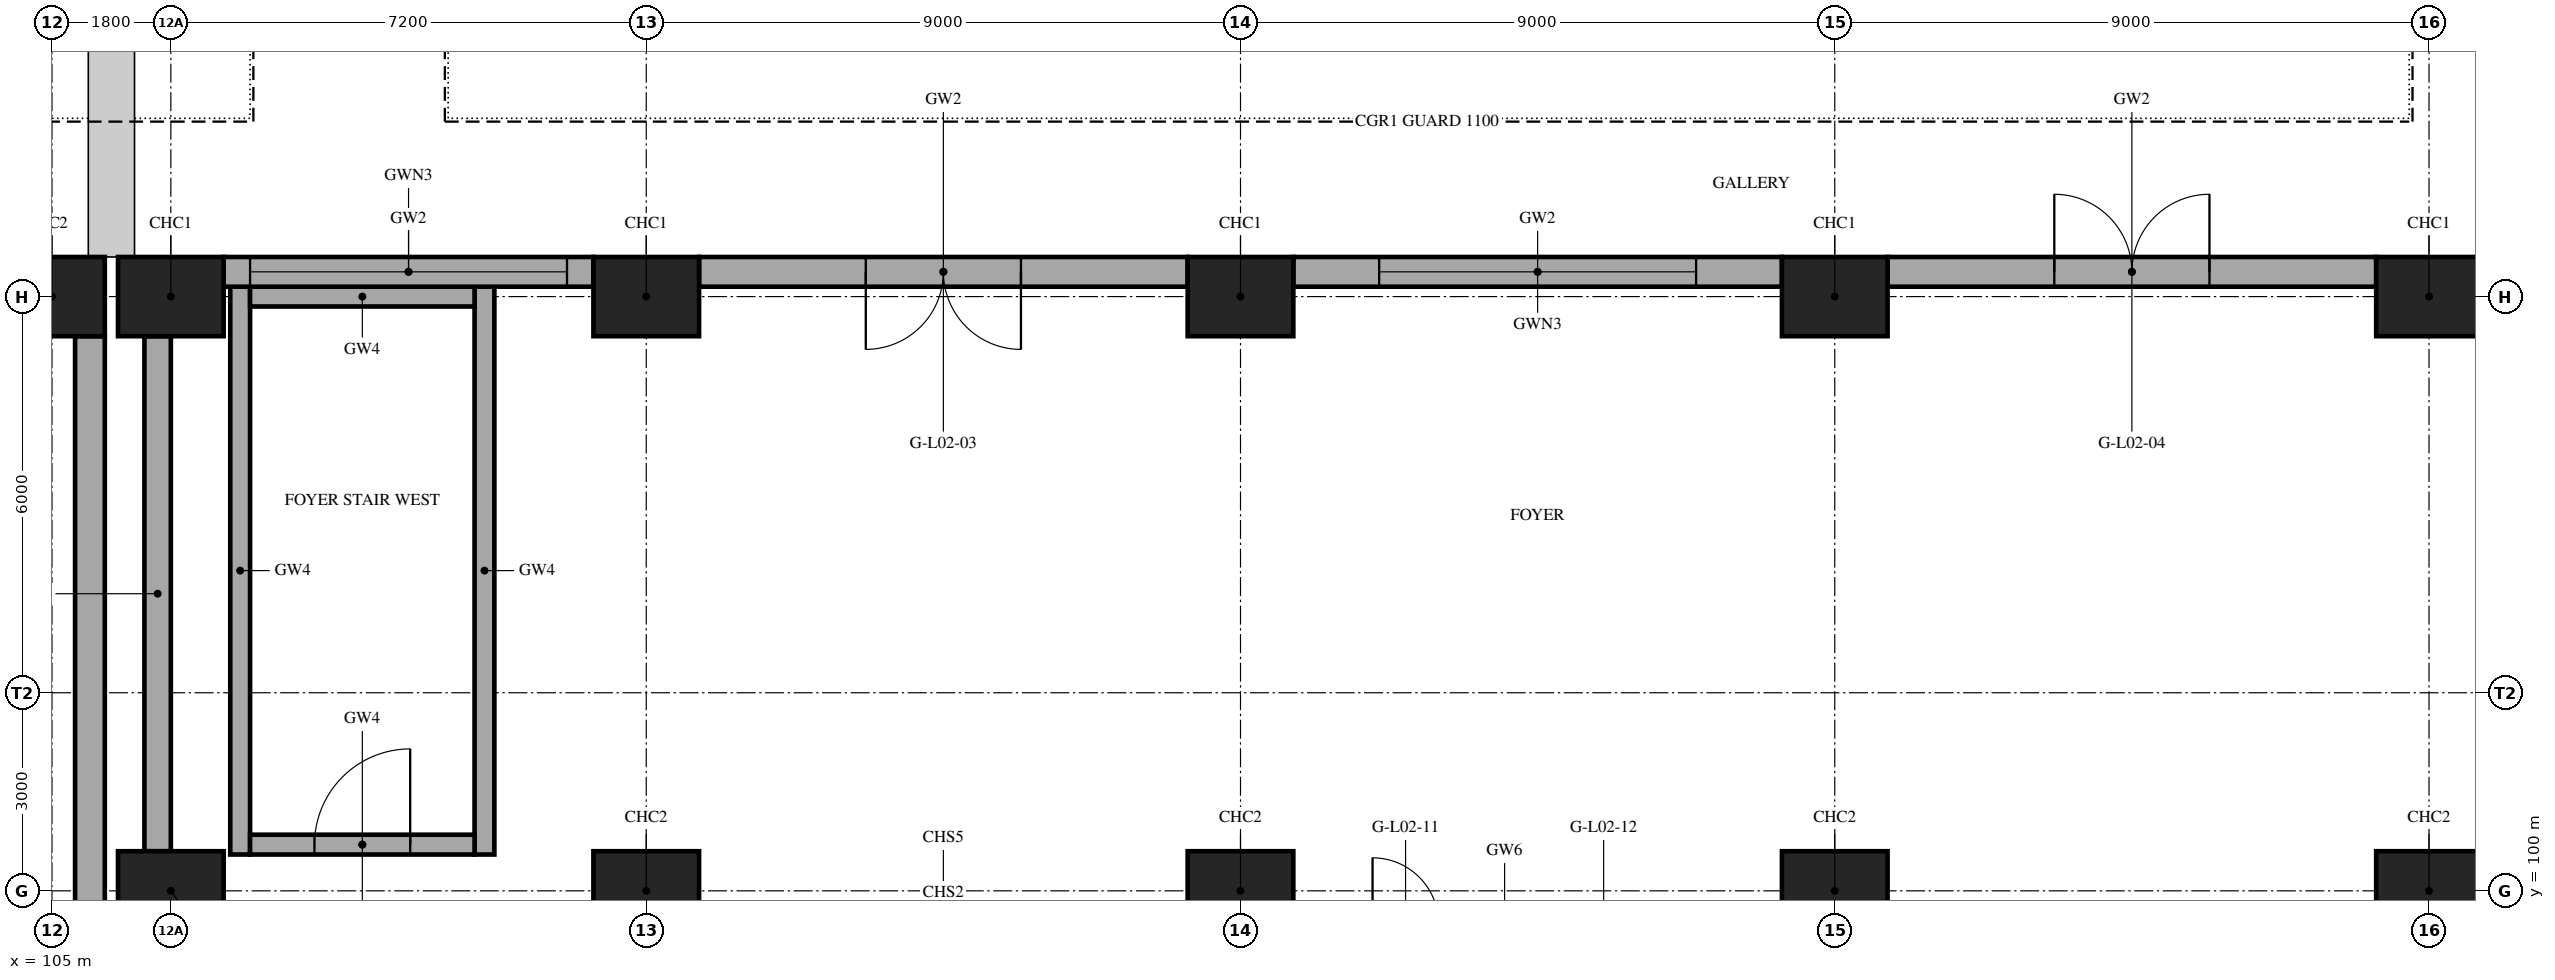
"""IFC4 building model, lengths in metres.
Left out: names, types, materials, properties, quantities, classifications, styles, units other than length and angle.
Written with IfcOpenShell. Run it as: python <this file> out.ifc"""

import sys

from ifc_helpers import new_model, si_unit, direction, frame, frame_2d, origin, origin_2d, place, context, subcontext, project, spatial, rectangle, extrude, element, fill, save


model = new_model("IFC4")
c1 = context("Model", 3, precision=1e-05, world=origin(), true_north=direction((0.0, 1.0)))
c2 = subcontext(c1, "Body", "Model", "MODEL_VIEW")
j1 = project(units=[si_unit("LENGTHUNIT", "METRE"), si_unit("PLANEANGLEUNIT", "RADIAN")], contexts=[c1])
p1 = place(None, origin())
s1 = spatial("IfcSite", under=j1, at=p1, CompositionType="ELEMENT")
p2 = place(p1, origin())
s2 = spatial("IfcBuilding", under=s1, at=p2, CompositionType="ELEMENT")
p3 = place(p2, frame((0.0, 0.0, 10.0)))
s3 = spatial("IfcBuildingStorey", under=s2, at=p3, CompositionType="ELEMENT", Elevation=10.0)
for number, where, z_axis, x_axis in (
    (1, (105.0, 109.0, 0.0), (0.0, 0.0, 1.0), (1.0, 0.0, 0.0)),
    (2, (106.8, 100.0, 0.0), (0.0, 0.0, 1.0), (1.0, 0.0, 0.0)),
    (3, (114.0, 100.0, 0.0), (0.0, 0.0, 1.0), (1.0, 0.0, 0.0)),
    (4, (123.0, 100.0, 0.0), (0.0, 0.0, 1.0), (1.0, 0.0, 0.0)),
    (5, (132.0, 100.0, 0.0), (0.0, 0.0, 1.0), (1.0, 0.0, 0.0)),
    (6, (141.0, 100.0, 0.0), (0.0, 0.0, 1.0), (1.0, 0.0, 0.0)),
    (7, (106.8, 109.0, 0.0), (0.0, 0.0, 1.0), (1.0, 0.0, 0.0)),
    (8, (114.0, 109.0, 0.0), (0.0, 0.0, 1.0), (1.0, 0.0, 0.0)),
    (9, (123.0, 109.0, 0.0), (0.0, 0.0, 1.0), (1.0, 0.0, 0.0)),
    (10, (132.0, 109.0, 0.0), (0.0, 0.0, 1.0), (1.0, 0.0, 0.0)),
    (11, (141.0, 109.0, 0.0), (0.0, 0.0, 1.0), (1.0, 0.0, 0.0)),
):
    element("IfcColumn", number, at=place(p3, frame(where, z_axis=z_axis, x_axis=x_axis)), inside=s3, PredefinedType="COLUMN", context=c2, shape_type="SweptSolid", body=[
        extrude(rectangle(XDim=1.6, YDim=1.2, at=origin_2d()), origin(), (0.0, 0.0, 1.0), 5.0),
    ])
for number, where, z_axis, x_axis in (
    (12, (107.85, 100.55, 0.0), (0.0, 0.0, 1.0), (0.0, 1.0, 0.0)),
    (13, (111.55, 100.55, 0.0), (0.0, 0.0, 1.0), (0.0, 1.0, 0.0)),
):
    element("IfcWall", number, at=place(p3, frame(where, z_axis=z_axis, x_axis=x_axis)), inside=s3, PredefinedType="SHEAR", context=c2, shape_type="SweptSolid", body=[
        extrude(rectangle(XDim=8.6, YDim=0.3, at=frame_2d((4.3, 0.0))), origin(), (0.0, 0.0, 1.0), 4.6),
    ])
p4 = place(p3, frame((108.0, 100.7, 0.0), z_axis=(0.0, 0.0, 1.0), x_axis=(1.0, 0.0, 0.0)))
e14 = element("IfcWall", 14, at=p4, inside=s3, PredefinedType="SHEAR", context=c2, shape_type="SweptSolid", body=[
    extrude(rectangle(XDim=3.4, YDim=0.3, at=frame_2d((1.7, 0.0))), origin(), (0.0, 0.0, 1.0), 4.6),
])
p5 = place(p4, frame((0.975, 0.0, 0.0)))
e15 = element("IfcOpeningElement", 15, at=p5, cuts=e14, PredefinedType="OPENING", context=c2, shape_type="SweptSolid", body=[
    extrude(rectangle(XDim=1.45, YDim=2.1, at=frame_2d((0.725, 1.05))), frame((0.0, 0.16, 0.0), z_axis=(0.0, -1.0, 0.0), x_axis=(1.0, 0.0, 0.0)), (0.0, 0.0, 1.0), 0.32),
])
p6 = place(p3, frame((108.0, 109.0, 0.0), z_axis=(0.0, 0.0, 1.0), x_axis=(1.0, 0.0, 0.0)))
e16 = element("IfcWall", 16, at=p6, inside=s3, PredefinedType="SHEAR", context=c2, shape_type="SweptSolid", body=[
    extrude(rectangle(XDim=3.4, YDim=0.3, at=frame_2d((1.7, 0.0))), origin(), (0.0, 0.0, 1.0), 4.6),
])
p7 = place(p3, frame((105.575, 46.75, 0.0), z_axis=(0.0, 0.0, 1.0), x_axis=(0.0, 1.0, 0.0)))
e17 = element("IfcWall", 17, at=p7, inside=s3, PredefinedType="SOLIDWALL", context=c2, shape_type="SweptSolid", body=[
    extrude(rectangle(XDim=61.65, YDim=0.45, at=frame_2d((30.825, 0.0))), origin(), (0.0, 0.0, 1.0), 5.0),
])
p8 = place(p3, frame((106.6, 100.6, 0.0), z_axis=(0.0, 0.0, 1.0), x_axis=(0.0, 1.0, 0.0)))
e18 = element("IfcWall", 18, at=p8, inside=s3, PredefinedType="SOLIDWALL", context=c2, shape_type="SweptSolid", body=[
    extrude(rectangle(XDim=7.8, YDim=0.4, at=frame_2d((3.9, 0.0))), origin(), (0.0, 0.0, 1.0), 5.0),
])
p9 = place(p3, frame((107.6, 109.375, 0.0), z_axis=(0.0, 0.0, 1.0), x_axis=(1.0, 0.0, 0.0)))
e19 = element("IfcWall", 19, at=p9, inside=s3, PredefinedType="SOLIDWALL", context=c2, shape_type="SweptSolid", body=[
    extrude(rectangle(XDim=5.6, YDim=0.45, at=frame_2d((2.8, 0.0))), origin(), (0.0, 0.0, 1.0), 5.0),
])
p10 = place(p9, frame((0.4, 0.0, 0.9)))
e20 = element("IfcOpeningElement", 20, at=p10, cuts=e19, PredefinedType="OPENING", context=c2, shape_type="SweptSolid", body=[
    extrude(rectangle(XDim=4.8, YDim=3.0, at=frame_2d((2.4, 1.5))), frame((0.0, 0.235, 0.0), z_axis=(0.0, -1.0, 0.0), x_axis=(1.0, 0.0, 0.0)), (0.0, 0.0, 1.0), 0.47),
])
p11 = place(p3, frame((114.8, 109.375, 0.0), z_axis=(0.0, 0.0, 1.0), x_axis=(1.0, 0.0, 0.0)))
e21 = element("IfcWall", 21, at=p11, inside=s3, PredefinedType="SOLIDWALL", context=c2, shape_type="SweptSolid", body=[
    extrude(rectangle(XDim=7.4, YDim=0.45, at=frame_2d((3.7, 0.0))), origin(), (0.0, 0.0, 1.0), 4.4),
])
p12 = place(p11, frame((2.525, 0.0, 0.0)))
e22 = element("IfcOpeningElement", 22, at=p12, cuts=e21, PredefinedType="OPENING", context=c2, shape_type="SweptSolid", body=[
    extrude(rectangle(XDim=2.35, YDim=2.4, at=frame_2d((1.175, 1.2))), frame((0.0, 0.235, 0.0), z_axis=(0.0, -1.0, 0.0), x_axis=(1.0, 0.0, 0.0)), (0.0, 0.0, 1.0), 0.47),
])
p13 = place(p3, frame((123.8, 109.375, 0.0), z_axis=(0.0, 0.0, 1.0), x_axis=(1.0, 0.0, 0.0)))
e23 = element("IfcWall", 23, at=p13, inside=s3, PredefinedType="SOLIDWALL", context=c2, shape_type="SweptSolid", body=[
    extrude(rectangle(XDim=7.4, YDim=0.45, at=frame_2d((3.7, 0.0))), origin(), (0.0, 0.0, 1.0), 5.0),
])
p14 = place(p13, frame((1.3, 0.0, 0.9)))
e24 = element("IfcOpeningElement", 24, at=p14, cuts=e23, PredefinedType="OPENING", context=c2, shape_type="SweptSolid", body=[
    extrude(rectangle(XDim=4.8, YDim=3.0, at=frame_2d((2.4, 1.5))), frame((0.0, 0.235, 0.0), z_axis=(0.0, -1.0, 0.0), x_axis=(1.0, 0.0, 0.0)), (0.0, 0.0, 1.0), 0.47),
])
p15 = place(p3, frame((132.8, 109.375, 0.0), z_axis=(0.0, 0.0, 1.0), x_axis=(1.0, 0.0, 0.0)))
e25 = element("IfcWall", 25, at=p15, inside=s3, PredefinedType="SOLIDWALL", context=c2, shape_type="SweptSolid", body=[
    extrude(rectangle(XDim=7.4, YDim=0.45, at=frame_2d((3.7, 0.0))), origin(), (0.0, 0.0, 1.0), 4.4),
])
p16 = place(p15, frame((2.525, 0.0, 0.0)))
e26 = element("IfcOpeningElement", 26, at=p16, cuts=e25, PredefinedType="OPENING", context=c2, shape_type="SweptSolid", body=[
    extrude(rectangle(XDim=2.35, YDim=2.4, at=frame_2d((1.175, 1.2))), frame((0.0, 0.235, 0.0), z_axis=(0.0, -1.0, 0.0), x_axis=(1.0, 0.0, 0.0)), (0.0, 0.0, 1.0), 0.47),
])
p17 = place(p12, frame((2.35, 0.0, 0.0), z_axis=(0.0, 0.0, 1.0), x_axis=(-1.0, 0.0, 0.0)))
e27 = element("IfcDoor", 27, at=p17, inside=s3, OperationType="DOUBLE_DOOR_SINGLE_SWING", PredefinedType="DOOR", context=c2, shape_type="SweptSolid", body=[
    extrude(rectangle(XDim=2.35, YDim=2.4, at=frame_2d((1.175, 1.2))), frame((0.0, 0.025, 0.0), z_axis=(0.0, -1.0, 0.0), x_axis=(1.0, 0.0, 0.0)), (0.0, 0.0, 1.0), 0.05),
])
fill(e22, e27)
p18 = place(p16, origin())
e28 = element("IfcDoor", 28, at=p18, inside=s3, OperationType="DOUBLE_DOOR_SINGLE_SWING", PredefinedType="DOOR", context=c2, shape_type="SweptSolid", body=[
    extrude(rectangle(XDim=2.35, YDim=2.4, at=frame_2d((1.175, 1.2))), frame((0.0, 0.025, 0.0), z_axis=(0.0, -1.0, 0.0), x_axis=(1.0, 0.0, 0.0)), (0.0, 0.0, 1.0), 0.05),
])
fill(e26, e28)
p19 = place(p10, origin())
e29 = element("IfcWindow", 29, at=p19, inside=s3, PartitioningType="SINGLE_PANEL", PredefinedType="WINDOW", context=c2, shape_type="SweptSolid", body=[
    extrude(rectangle(XDim=4.8, YDim=3.0, at=frame_2d((2.4, 1.5))), frame((0.0, 0.03, 0.0), z_axis=(0.0, -1.0, 0.0), x_axis=(1.0, 0.0, 0.0)), (0.0, 0.0, 1.0), 0.06),
])
fill(e20, e29)
p20 = place(p14, origin())
e30 = element("IfcWindow", 30, at=p20, inside=s3, PartitioningType="SINGLE_PANEL", PredefinedType="WINDOW", context=c2, shape_type="SweptSolid", body=[
    extrude(rectangle(XDim=4.8, YDim=3.0, at=frame_2d((2.4, 1.5))), frame((0.0, 0.03, 0.0), z_axis=(0.0, -1.0, 0.0), x_axis=(1.0, 0.0, 0.0)), (0.0, 0.0, 1.0), 0.06),
])
fill(e24, e30)
p21 = place(p5, origin())
e31 = element("IfcDoor", 31, at=p21, inside=s3, OperationType="SINGLE_SWING_RIGHT", PredefinedType="DOOR", context=c2, shape_type="SweptSolid", body=[
    extrude(rectangle(XDim=1.45, YDim=2.1, at=frame_2d((0.725, 1.05))), frame((0.0, 0.025, 0.0), z_axis=(0.0, -1.0, 0.0), x_axis=(1.0, 0.0, 0.0)), (0.0, 0.0, 1.0), 0.05),
])
fill(e15, e31)
save(model, sys.argv[1])
